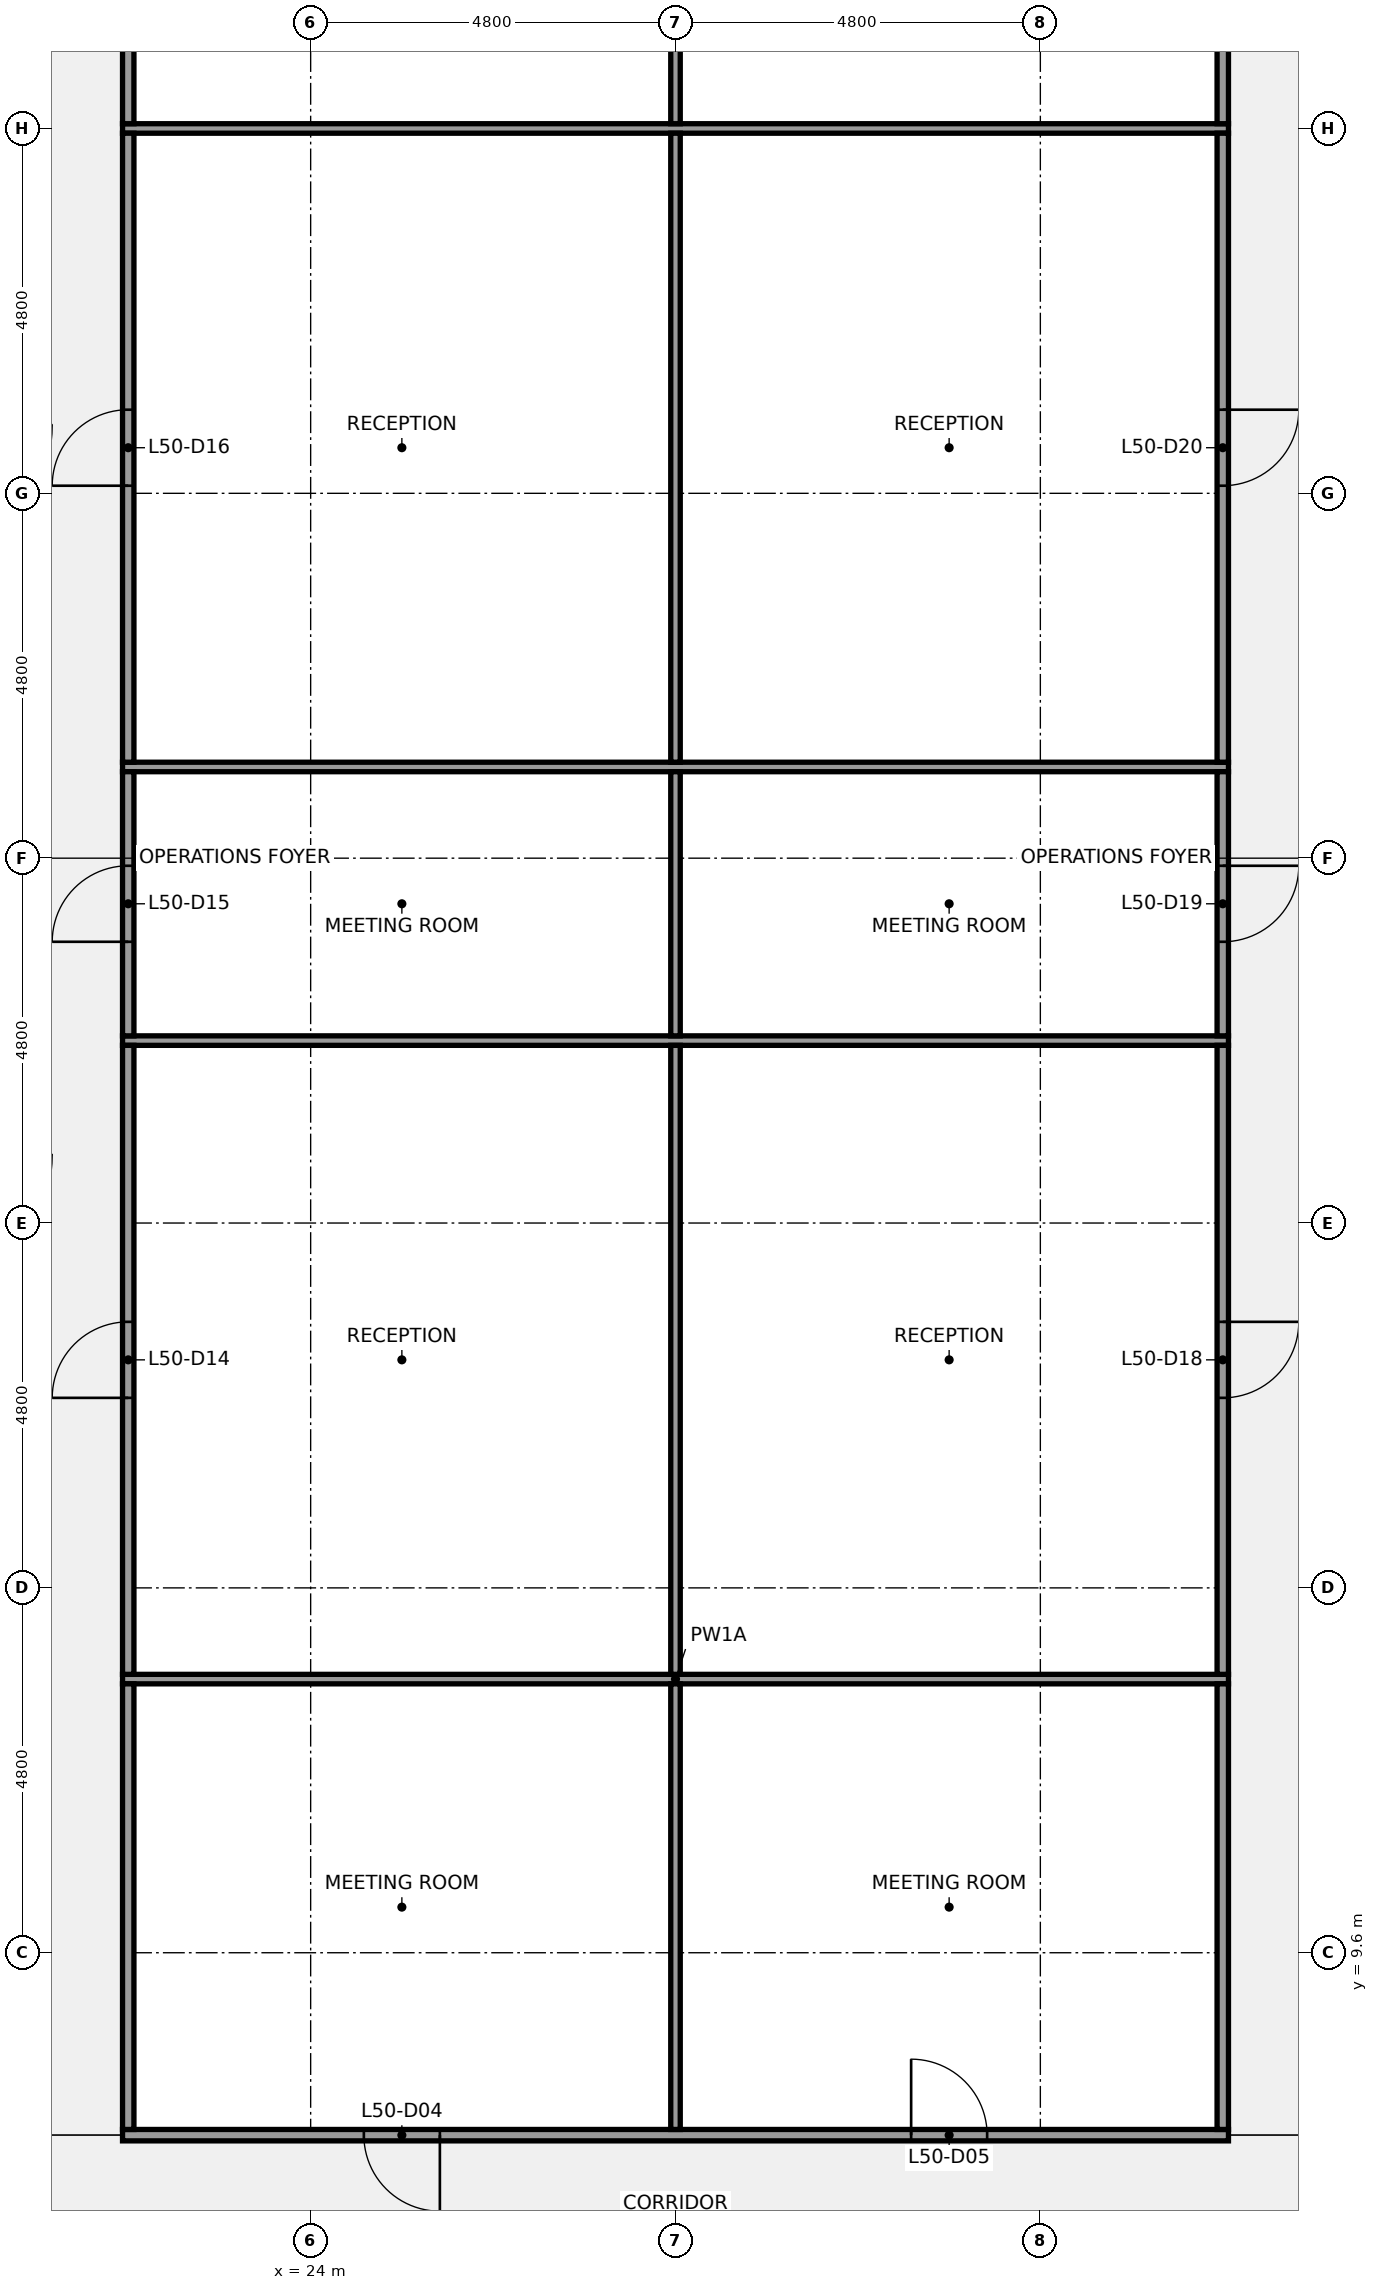
"""IFC4 building model, lengths in metres.
Left out: names, types, materials, properties, quantities, classifications, styles, units other than length and angle.
Written with IfcOpenShell. Run it as: python <this file> out.ifc"""

import sys

from ifc_helpers import new_model, si_unit, direction, frame, frame_2d, origin, place, context, subcontext, project, spatial, rectangle, extrude, element, fill, save


model = new_model("IFC4")
c1 = context("Model", 3, precision=1e-05, world=origin(), true_north=direction((0.0, 1.0)))
c2 = subcontext(c1, "Body", "Model", "MODEL_VIEW")
j1 = project(units=[si_unit("LENGTHUNIT", "METRE"), si_unit("PLANEANGLEUNIT", "RADIAN")], contexts=[c1])
p1 = place(None, origin())
s1 = spatial("IfcSite", under=j1, at=p1, CompositionType="ELEMENT")
p2 = place(p1, origin())
s2 = spatial("IfcBuilding", under=s1, at=p2, CompositionType="ELEMENT")
p3 = place(p2, frame((0.0, 0.0, 229.2)))
s3 = spatial("IfcBuildingStorey", under=s2, at=p3, CompositionType="ELEMENT", Elevation=229.2)
p4 = place(p3, frame((21.525, 7.2, 0.0), z_axis=(0.0, 0.0, 1.0), x_axis=(1.0, 0.0, 0.0)))
e1 = element("IfcWall", 1, at=p4, inside=s3, PredefinedType="PARTITIONING", context=c2, shape_type="SweptSolid", body=[
    extrude(rectangle(XDim=14.55, YDim=0.15, at=frame_2d((7.275, 0.0))), origin(), (0.0, 0.0, 1.0), 2.849),
])
p5 = place(p4, frame((3.175, 0.0, 0.0)))
e2 = element("IfcOpeningElement", 2, at=p5, cuts=e1, PredefinedType="OPENING", context=c2, shape_type="SweptSolid", body=[
    extrude(rectangle(XDim=1.0, YDim=2.1, at=frame_2d((0.5, 1.05))), frame((0.0, 0.085, 0.0), z_axis=(0.0, -1.0, 0.0), x_axis=(1.0, 0.0, 0.0)), (0.0, 0.0, 1.0), 0.17),
])
p6 = place(p4, frame((10.375, 0.0, 0.0)))
e3 = element("IfcOpeningElement", 3, at=p6, cuts=e1, PredefinedType="OPENING", context=c2, shape_type="SweptSolid", body=[
    extrude(rectangle(XDim=1.0, YDim=2.1, at=frame_2d((0.5, 1.05))), frame((0.0, 0.085, 0.0), z_axis=(0.0, -1.0, 0.0), x_axis=(1.0, 0.0, 0.0)), (0.0, 0.0, 1.0), 0.17),
])
for number, where, z_axis, x_axis in (
    (4, (21.525, 13.2, 0.0), (0.0, 0.0, 1.0), (1.0, 0.0, 0.0)),
    (5, (21.525, 21.6, 0.0), (0.0, 0.0, 1.0), (1.0, 0.0, 0.0)),
    (6, (21.525, 25.2, 0.0), (0.0, 0.0, 1.0), (1.0, 0.0, 0.0)),
    (7, (21.525, 33.6, 0.0), (0.0, 0.0, 1.0), (1.0, 0.0, 0.0)),
):
    element("IfcWall", number, at=place(p3, frame(where, z_axis=z_axis, x_axis=x_axis)), inside=s3, PredefinedType="PARTITIONING", context=c2, shape_type="SweptSolid", body=[
        extrude(rectangle(XDim=14.55, YDim=0.125, at=frame_2d((7.275, 0.0))), origin(), (0.0, 0.0, 1.0), 2.849),
    ])
p7 = place(p3, frame((21.6, 7.275, 0.0), z_axis=(0.0, 0.0, 1.0), x_axis=(0.0, 1.0, 0.0)))
e8 = element("IfcWall", 8, at=p7, inside=s3, PredefinedType="PARTITIONING", context=c2, shape_type="SweptSolid", body=[
    extrude(rectangle(XDim=5.863, YDim=0.15, at=frame_2d((2.931, 0.0))), origin(), (0.0, 0.0, 1.0), 2.849),
])
p8 = place(p3, frame((21.6, 13.262, 0.0), z_axis=(0.0, 0.0, 1.0), x_axis=(0.0, 1.0, 0.0)))
e9 = element("IfcWall", 9, at=p8, inside=s3, PredefinedType="PARTITIONING", context=c2, shape_type="SweptSolid", body=[
    extrude(rectangle(XDim=8.275, YDim=0.15, at=frame_2d((4.138, 0.0))), origin(), (0.0, 0.0, 1.0), 2.849),
])
p9 = place(p8, frame((3.637, 0.0, 0.0)))
e10 = element("IfcOpeningElement", 10, at=p9, cuts=e9, PredefinedType="OPENING", context=c2, shape_type="SweptSolid", body=[
    extrude(rectangle(XDim=1.0, YDim=2.1, at=frame_2d((0.5, 1.05))), frame((0.0, 0.085, 0.0), z_axis=(0.0, -1.0, 0.0), x_axis=(1.0, 0.0, 0.0)), (0.0, 0.0, 1.0), 0.17),
])
p10 = place(p3, frame((21.6, 21.663, 0.0), z_axis=(0.0, 0.0, 1.0), x_axis=(0.0, 1.0, 0.0)))
e11 = element("IfcWall", 11, at=p10, inside=s3, PredefinedType="PARTITIONING", context=c2, shape_type="SweptSolid", body=[
    extrude(rectangle(XDim=3.475, YDim=0.15, at=frame_2d((1.737, 0.0))), origin(), (0.0, 0.0, 1.0), 2.849),
])
p11 = place(p10, frame((1.238, 0.0, 0.0)))
e12 = element("IfcOpeningElement", 12, at=p11, cuts=e11, PredefinedType="OPENING", context=c2, shape_type="SweptSolid", body=[
    extrude(rectangle(XDim=1.0, YDim=2.1, at=frame_2d((0.5, 1.05))), frame((0.0, 0.085, 0.0), z_axis=(0.0, -1.0, 0.0), x_axis=(1.0, 0.0, 0.0)), (0.0, 0.0, 1.0), 0.17),
])
p12 = place(p3, frame((21.6, 25.262, 0.0), z_axis=(0.0, 0.0, 1.0), x_axis=(0.0, 1.0, 0.0)))
e13 = element("IfcWall", 13, at=p12, inside=s3, PredefinedType="PARTITIONING", context=c2, shape_type="SweptSolid", body=[
    extrude(rectangle(XDim=8.275, YDim=0.15, at=frame_2d((4.138, 0.0))), origin(), (0.0, 0.0, 1.0), 2.849),
])
p13 = place(p12, frame((3.637, 0.0, 0.0)))
e14 = element("IfcOpeningElement", 14, at=p13, cuts=e13, PredefinedType="OPENING", context=c2, shape_type="SweptSolid", body=[
    extrude(rectangle(XDim=1.0, YDim=2.1, at=frame_2d((0.5, 1.05))), frame((0.0, 0.085, 0.0), z_axis=(0.0, -1.0, 0.0), x_axis=(1.0, 0.0, 0.0)), (0.0, 0.0, 1.0), 0.17),
])
p14 = place(p3, frame((21.6, 33.663, 0.0), z_axis=(0.0, 0.0, 1.0), x_axis=(0.0, 1.0, 0.0)))
e15 = element("IfcWall", 15, at=p14, inside=s3, PredefinedType="PARTITIONING", context=c2, shape_type="SweptSolid", body=[
    extrude(rectangle(XDim=3.475, YDim=0.15, at=frame_2d((1.737, 0.0))), origin(), (0.0, 0.0, 1.0), 2.849),
])
p15 = place(p14, frame((1.238, 0.0, 0.0)))
e16 = element("IfcOpeningElement", 16, at=p15, cuts=e15, PredefinedType="OPENING", context=c2, shape_type="SweptSolid", body=[
    extrude(rectangle(XDim=1.0, YDim=2.1, at=frame_2d((0.5, 1.05))), frame((0.0, 0.085, 0.0), z_axis=(0.0, -1.0, 0.0), x_axis=(1.0, 0.0, 0.0)), (0.0, 0.0, 1.0), 0.17),
])
p16 = place(p3, frame((28.8, 7.275, 0.0), z_axis=(0.0, 0.0, 1.0), x_axis=(0.0, 1.0, 0.0)))
e17 = element("IfcWall", 17, at=p16, inside=s3, PredefinedType="PARTITIONING", context=c2, shape_type="SweptSolid", body=[
    extrude(rectangle(XDim=5.863, YDim=0.125, at=frame_2d((2.931, 0.0))), origin(), (0.0, 0.0, 1.0), 2.849),
])
p17 = place(p3, frame((28.8, 13.262, 0.0), z_axis=(0.0, 0.0, 1.0), x_axis=(0.0, 1.0, 0.0)))
e18 = element("IfcWall", 18, at=p17, inside=s3, PredefinedType="PARTITIONING", context=c2, shape_type="SweptSolid", body=[
    extrude(rectangle(XDim=8.275, YDim=0.125, at=frame_2d((4.138, 0.0))), origin(), (0.0, 0.0, 1.0), 2.849),
])
p18 = place(p3, frame((28.8, 21.663, 0.0), z_axis=(0.0, 0.0, 1.0), x_axis=(0.0, 1.0, 0.0)))
e19 = element("IfcWall", 19, at=p18, inside=s3, PredefinedType="PARTITIONING", context=c2, shape_type="SweptSolid", body=[
    extrude(rectangle(XDim=3.475, YDim=0.125, at=frame_2d((1.737, 0.0))), origin(), (0.0, 0.0, 1.0), 2.849),
])
p19 = place(p3, frame((28.8, 25.262, 0.0), z_axis=(0.0, 0.0, 1.0), x_axis=(0.0, 1.0, 0.0)))
e20 = element("IfcWall", 20, at=p19, inside=s3, PredefinedType="PARTITIONING", context=c2, shape_type="SweptSolid", body=[
    extrude(rectangle(XDim=8.275, YDim=0.125, at=frame_2d((4.138, 0.0))), origin(), (0.0, 0.0, 1.0), 2.849),
])
p20 = place(p3, frame((28.8, 33.663, 0.0), z_axis=(0.0, 0.0, 1.0), x_axis=(0.0, 1.0, 0.0)))
e21 = element("IfcWall", 21, at=p20, inside=s3, PredefinedType="PARTITIONING", context=c2, shape_type="SweptSolid", body=[
    extrude(rectangle(XDim=3.475, YDim=0.125, at=frame_2d((1.737, 0.0))), origin(), (0.0, 0.0, 1.0), 2.849),
])
p21 = place(p3, frame((36.0, 7.275, 0.0), z_axis=(0.0, 0.0, 1.0), x_axis=(0.0, 1.0, 0.0)))
e22 = element("IfcWall", 22, at=p21, inside=s3, PredefinedType="PARTITIONING", context=c2, shape_type="SweptSolid", body=[
    extrude(rectangle(XDim=5.863, YDim=0.15, at=frame_2d((2.931, 0.0))), origin(), (0.0, 0.0, 1.0), 2.849),
])
p22 = place(p3, frame((36.0, 13.262, 0.0), z_axis=(0.0, 0.0, 1.0), x_axis=(0.0, 1.0, 0.0)))
e23 = element("IfcWall", 23, at=p22, inside=s3, PredefinedType="PARTITIONING", context=c2, shape_type="SweptSolid", body=[
    extrude(rectangle(XDim=8.275, YDim=0.15, at=frame_2d((4.138, 0.0))), origin(), (0.0, 0.0, 1.0), 2.849),
])
p23 = place(p22, frame((3.637, 0.0, 0.0)))
e24 = element("IfcOpeningElement", 24, at=p23, cuts=e23, PredefinedType="OPENING", context=c2, shape_type="SweptSolid", body=[
    extrude(rectangle(XDim=1.0, YDim=2.1, at=frame_2d((0.5, 1.05))), frame((0.0, 0.085, 0.0), z_axis=(0.0, -1.0, 0.0), x_axis=(1.0, 0.0, 0.0)), (0.0, 0.0, 1.0), 0.17),
])
p24 = place(p3, frame((36.0, 21.663, 0.0), z_axis=(0.0, 0.0, 1.0), x_axis=(0.0, 1.0, 0.0)))
e25 = element("IfcWall", 25, at=p24, inside=s3, PredefinedType="PARTITIONING", context=c2, shape_type="SweptSolid", body=[
    extrude(rectangle(XDim=3.475, YDim=0.15, at=frame_2d((1.737, 0.0))), origin(), (0.0, 0.0, 1.0), 2.849),
])
p25 = place(p24, frame((1.238, 0.0, 0.0)))
e26 = element("IfcOpeningElement", 26, at=p25, cuts=e25, PredefinedType="OPENING", context=c2, shape_type="SweptSolid", body=[
    extrude(rectangle(XDim=1.0, YDim=2.1, at=frame_2d((0.5, 1.05))), frame((0.0, 0.085, 0.0), z_axis=(0.0, -1.0, 0.0), x_axis=(1.0, 0.0, 0.0)), (0.0, 0.0, 1.0), 0.17),
])
p26 = place(p3, frame((36.0, 25.262, 0.0), z_axis=(0.0, 0.0, 1.0), x_axis=(0.0, 1.0, 0.0)))
e27 = element("IfcWall", 27, at=p26, inside=s3, PredefinedType="PARTITIONING", context=c2, shape_type="SweptSolid", body=[
    extrude(rectangle(XDim=8.275, YDim=0.15, at=frame_2d((4.138, 0.0))), origin(), (0.0, 0.0, 1.0), 2.849),
])
p27 = place(p26, frame((3.637, 0.0, 0.0)))
e28 = element("IfcOpeningElement", 28, at=p27, cuts=e27, PredefinedType="OPENING", context=c2, shape_type="SweptSolid", body=[
    extrude(rectangle(XDim=1.0, YDim=2.1, at=frame_2d((0.5, 1.05))), frame((0.0, 0.085, 0.0), z_axis=(0.0, -1.0, 0.0), x_axis=(1.0, 0.0, 0.0)), (0.0, 0.0, 1.0), 0.17),
])
p28 = place(p3, frame((36.0, 33.663, 0.0), z_axis=(0.0, 0.0, 1.0), x_axis=(0.0, 1.0, 0.0)))
e29 = element("IfcWall", 29, at=p28, inside=s3, PredefinedType="PARTITIONING", context=c2, shape_type="SweptSolid", body=[
    extrude(rectangle(XDim=3.475, YDim=0.15, at=frame_2d((1.737, 0.0))), origin(), (0.0, 0.0, 1.0), 2.849),
])
p29 = place(p28, frame((1.238, 0.0, 0.0)))
e30 = element("IfcOpeningElement", 30, at=p29, cuts=e29, PredefinedType="OPENING", context=c2, shape_type="SweptSolid", body=[
    extrude(rectangle(XDim=1.0, YDim=2.1, at=frame_2d((0.5, 1.05))), frame((0.0, 0.085, 0.0), z_axis=(0.0, -1.0, 0.0), x_axis=(1.0, 0.0, 0.0)), (0.0, 0.0, 1.0), 0.17),
])
p30 = place(p5, origin())
e31 = element("IfcDoor", 31, at=p30, inside=s3, OperationType="SINGLE_SWING_RIGHT", PredefinedType="DOOR", context=c2, shape_type="SweptSolid", body=[
    extrude(rectangle(XDim=1.0, YDim=2.1, at=frame_2d((0.5, 1.05))), frame((0.0, 0.025, 0.0), z_axis=(0.0, -1.0, 0.0), x_axis=(1.0, 0.0, 0.0)), (0.0, 0.0, 1.0), 0.05),
])
fill(e2, e31)
p31 = place(p6, origin())
e32 = element("IfcDoor", 32, at=p31, inside=s3, OperationType="SINGLE_SWING_LEFT", PredefinedType="DOOR", context=c2, shape_type="SweptSolid", body=[
    extrude(rectangle(XDim=1.0, YDim=2.1, at=frame_2d((0.5, 1.05))), frame((0.0, 0.025, 0.0), z_axis=(0.0, -1.0, 0.0), x_axis=(1.0, 0.0, 0.0)), (0.0, 0.0, 1.0), 0.05),
])
fill(e3, e32)
p32 = place(p9, origin())
e33 = element("IfcDoor", 33, at=p32, inside=s3, OperationType="SINGLE_SWING_LEFT", PredefinedType="DOOR", context=c2, shape_type="SweptSolid", body=[
    extrude(rectangle(XDim=1.0, YDim=2.1, at=frame_2d((0.5, 1.05))), frame((0.0, 0.025, 0.0), z_axis=(0.0, -1.0, 0.0), x_axis=(1.0, 0.0, 0.0)), (0.0, 0.0, 1.0), 0.05),
])
fill(e10, e33)
p33 = place(p11, origin())
e34 = element("IfcDoor", 34, at=p33, inside=s3, OperationType="SINGLE_SWING_LEFT", PredefinedType="DOOR", context=c2, shape_type="SweptSolid", body=[
    extrude(rectangle(XDim=1.0, YDim=2.1, at=frame_2d((0.5, 1.05))), frame((0.0, 0.025, 0.0), z_axis=(0.0, -1.0, 0.0), x_axis=(1.0, 0.0, 0.0)), (0.0, 0.0, 1.0), 0.05),
])
fill(e12, e34)
p34 = place(p13, origin())
e35 = element("IfcDoor", 35, at=p34, inside=s3, OperationType="SINGLE_SWING_LEFT", PredefinedType="DOOR", context=c2, shape_type="SweptSolid", body=[
    extrude(rectangle(XDim=1.0, YDim=2.1, at=frame_2d((0.5, 1.05))), frame((0.0, 0.025, 0.0), z_axis=(0.0, -1.0, 0.0), x_axis=(1.0, 0.0, 0.0)), (0.0, 0.0, 1.0), 0.05),
])
fill(e14, e35)
p35 = place(p23, origin())
e36 = element("IfcDoor", 36, at=p35, inside=s3, OperationType="SINGLE_SWING_RIGHT", PredefinedType="DOOR", context=c2, shape_type="SweptSolid", body=[
    extrude(rectangle(XDim=1.0, YDim=2.1, at=frame_2d((0.5, 1.05))), frame((0.0, 0.025, 0.0), z_axis=(0.0, -1.0, 0.0), x_axis=(1.0, 0.0, 0.0)), (0.0, 0.0, 1.0), 0.05),
])
fill(e24, e36)
p36 = place(p25, origin())
e37 = element("IfcDoor", 37, at=p36, inside=s3, OperationType="SINGLE_SWING_RIGHT", PredefinedType="DOOR", context=c2, shape_type="SweptSolid", body=[
    extrude(rectangle(XDim=1.0, YDim=2.1, at=frame_2d((0.5, 1.05))), frame((0.0, 0.025, 0.0), z_axis=(0.0, -1.0, 0.0), x_axis=(1.0, 0.0, 0.0)), (0.0, 0.0, 1.0), 0.05),
])
fill(e26, e37)
p37 = place(p27, origin())
e38 = element("IfcDoor", 38, at=p37, inside=s3, OperationType="SINGLE_SWING_RIGHT", PredefinedType="DOOR", context=c2, shape_type="SweptSolid", body=[
    extrude(rectangle(XDim=1.0, YDim=2.1, at=frame_2d((0.5, 1.05))), frame((0.0, 0.025, 0.0), z_axis=(0.0, -1.0, 0.0), x_axis=(1.0, 0.0, 0.0)), (0.0, 0.0, 1.0), 0.05),
])
fill(e28, e38)
save(model, sys.argv[1])
